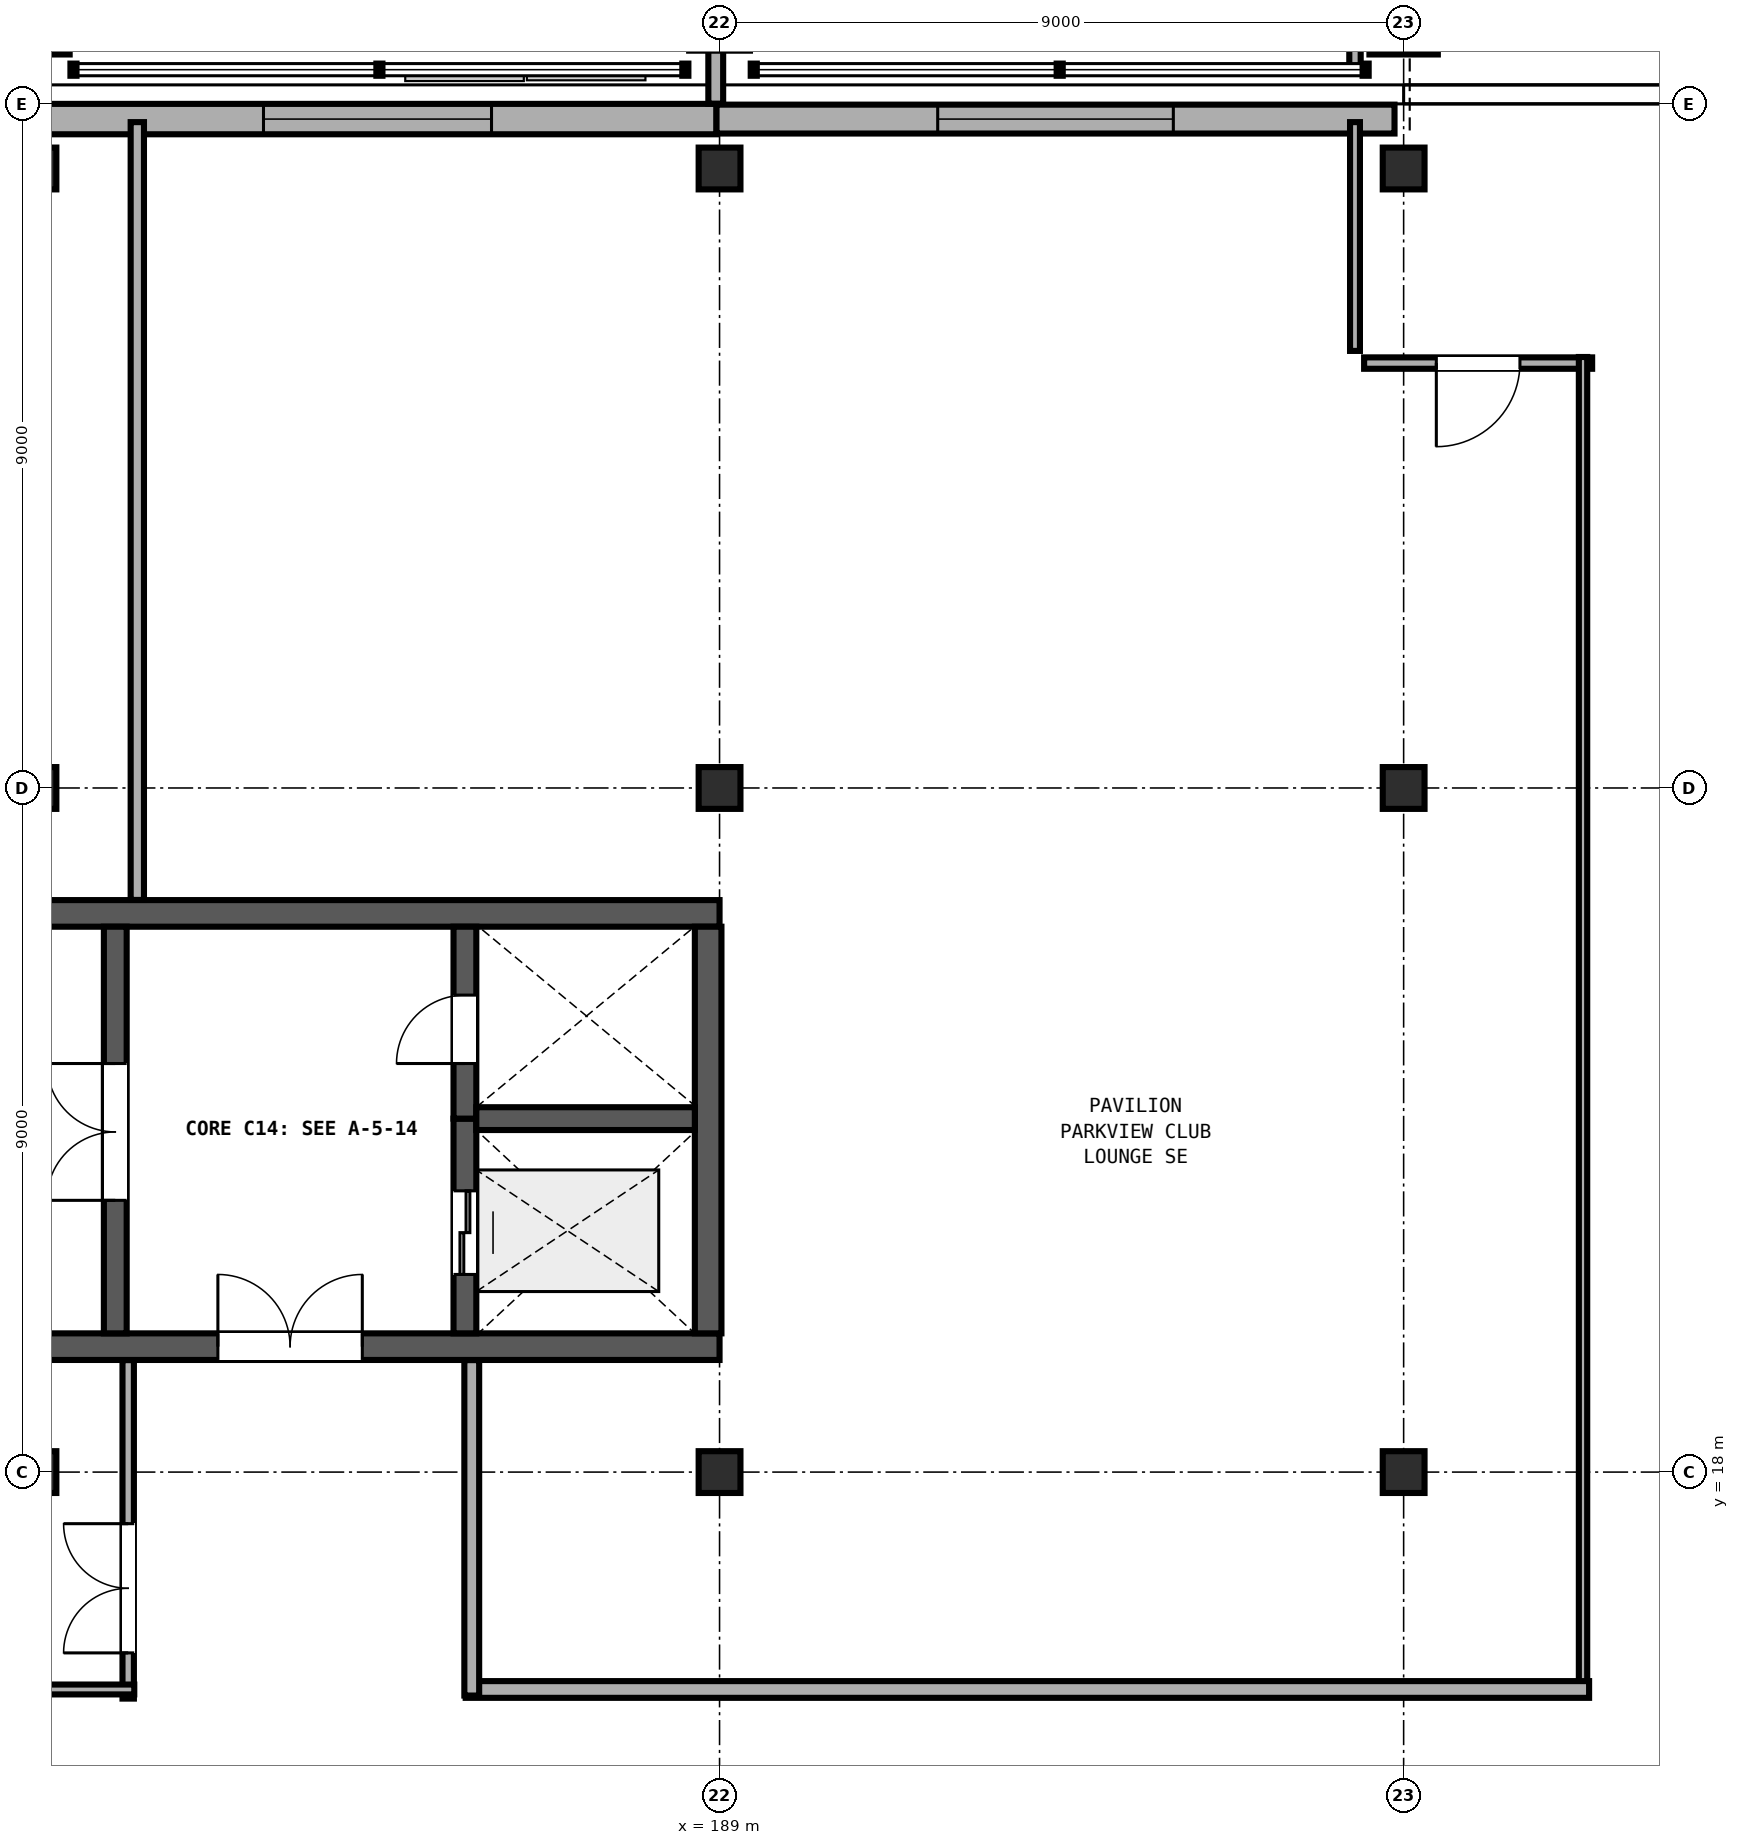
"""IFC4 building model, lengths in metres.
Left out: names, types, materials, properties, quantities, classifications, styles, units other than length and angle.
Written with IfcOpenShell. Run it as: python <this file> out.ifc"""

import sys

from ifc_helpers import new_model, si_unit, direction, frame, frame_2d, origin, origin_2d, place, context, subcontext, project, spatial, rectangle, extrude, element, fill, save


model = new_model("IFC4")
c1 = context("Model", 3, precision=1e-05, world=origin(), true_north=direction((0.0, 1.0)))
c2 = subcontext(c1, "Body", "Model", "MODEL_VIEW")
j1 = project(units=[si_unit("LENGTHUNIT", "METRE"), si_unit("PLANEANGLEUNIT", "RADIAN")], contexts=[c1])
p1 = place(None, origin())
s1 = spatial("IfcSite", under=j1, at=p1, CompositionType="ELEMENT")
p2 = place(p1, origin())
s2 = spatial("IfcBuilding", under=s1, at=p2, CompositionType="ELEMENT")
p3 = place(p2, frame((0.0, 0.0, 9.6)))
s3 = spatial("IfcBuildingStorey", under=s2, at=p3, CompositionType="ELEMENT", Elevation=9.6)
for number, where, z_axis, x_axis in (
    (1, (180.0, 37.1, 0.0), (0.0, 0.0, 1.0), (1.0, 0.0, 0.0)),
    (2, (198.0, 37.1, 0.0), (0.0, 0.0, 1.0), (1.0, 0.0, 0.0)),
):
    element("IfcColumn", number, at=place(p3, frame(where, z_axis=z_axis, x_axis=x_axis)), inside=s3, PredefinedType="COLUMN", context=c2, shape_type="SweptSolid", body=[
        extrude(rectangle(XDim=0.9, YDim=0.9, at=origin_2d()), origin(), (0.0, 0.0, 1.0), 4.8),
    ])
for number, where, z_axis, x_axis in (
    (3, (180.0, 18.0, 0.0), (0.0, 0.0, 1.0), (1.0, 0.0, 0.0)),
    (4, (180.0, 27.0, 0.0), (0.0, 0.0, 1.0), (1.0, 0.0, 0.0)),
    (5, (180.0, 35.15, 0.0), (0.0, 0.0, 1.0), (1.0, 0.0, 0.0)),
    (6, (189.0, 18.0, 0.0), (0.0, 0.0, 1.0), (1.0, 0.0, 0.0)),
    (7, (189.0, 27.0, 0.0), (0.0, 0.0, 1.0), (1.0, 0.0, 0.0)),
    (8, (189.0, 35.15, 0.0), (0.0, 0.0, 1.0), (1.0, 0.0, 0.0)),
    (9, (198.0, 18.0, 0.0), (0.0, 0.0, 1.0), (1.0, 0.0, 0.0)),
    (10, (198.0, 27.0, 0.0), (0.0, 0.0, 1.0), (1.0, 0.0, 0.0)),
    (11, (198.0, 35.15, 0.0), (0.0, 0.0, 1.0), (1.0, 0.0, 0.0)),
):
    element("IfcColumn", number, at=place(p3, frame(where, z_axis=z_axis, x_axis=x_axis)), inside=s3, PredefinedType="COLUMN", context=c2, shape_type="SweptSolid", body=[
        extrude(rectangle(XDim=0.55, YDim=0.55, at=origin_2d()), origin(), (0.0, 0.0, 1.0), 4.8),
    ])
p4 = place(p3, frame((171.0, 19.65, 0.0), z_axis=(0.0, 0.0, 1.0), x_axis=(1.0, 0.0, 0.0)))
e12 = element("IfcWall", 12, at=p4, inside=s3, PredefinedType="SHEAR", context=c2, shape_type="SweptSolid", body=[
    extrude(rectangle(XDim=18.0, YDim=0.35, at=frame_2d((9.0, 0.0))), origin(), (0.0, 0.0, 1.0), 4.555),
])
p5 = place(p4, frame((11.4, 0.0, 0.0)))
e13 = element("IfcOpeningElement", 13, at=p5, cuts=e12, PredefinedType="OPENING", context=c2, shape_type="SweptSolid", body=[
    extrude(rectangle(XDim=1.9, YDim=2.25, at=frame_2d((0.95, 1.125))), frame((0.0, 0.185, 0.0), z_axis=(0.0, -1.0, 0.0), x_axis=(1.0, 0.0, 0.0)), (0.0, 0.0, 1.0), 0.37),
])
p6 = place(p3, frame((189.0, 25.35, 0.0), z_axis=(0.0, 0.0, 1.0), x_axis=(-1.0, 0.0, 0.0)))
e14 = element("IfcWall", 14, at=p6, inside=s3, PredefinedType="SHEAR", context=c2, shape_type="SweptSolid", body=[
    extrude(rectangle(XDim=18.0, YDim=0.35, at=frame_2d((9.0, 0.0))), origin(), (0.0, 0.0, 1.0), 4.555),
])
p7 = place(p3, frame((188.85, 19.825, 0.0), z_axis=(0.0, 0.0, 1.0), x_axis=(0.0, 1.0, 0.0)))
e15 = element("IfcWall", 15, at=p7, inside=s3, PredefinedType="SHEAR", context=c2, shape_type="SweptSolid", body=[
    extrude(rectangle(XDim=5.35, YDim=0.35, at=frame_2d((2.675, 0.0))), origin(), (0.0, 0.0, 1.0), 4.555),
])
p8 = place(p3, frame((181.05, 19.825, 0.0), z_axis=(0.0, 0.0, 1.0), x_axis=(0.0, 1.0, 0.0)))
e16 = element("IfcWall", 16, at=p8, inside=s3, PredefinedType="SHEAR", context=c2, shape_type="SweptSolid", body=[
    extrude(rectangle(XDim=5.35, YDim=0.3, at=frame_2d((2.675, 0.0))), origin(), (0.0, 0.0, 1.0), 4.555),
])
p9 = place(p8, frame((1.75, 0.0, 0.0)))
e17 = element("IfcOpeningElement", 17, at=p9, cuts=e16, PredefinedType="OPENING", context=c2, shape_type="SweptSolid", body=[
    extrude(rectangle(XDim=1.8, YDim=2.25, at=frame_2d((0.9, 1.125))), frame((0.0, 0.16, 0.0), z_axis=(0.0, -1.0, 0.0), x_axis=(1.0, 0.0, 0.0)), (0.0, 0.0, 1.0), 0.32),
])
p10 = place(p3, frame((185.65, 19.825, 0.0), z_axis=(0.0, 0.0, 1.0), x_axis=(0.0, 1.0, 0.0)))
e18 = element("IfcWall", 18, at=p10, inside=s3, PredefinedType="SHEAR", context=c2, shape_type="SweptSolid", body=[
    extrude(rectangle(XDim=2.825, YDim=0.3, at=frame_2d((1.413, 0.0))), origin(), (0.0, 0.0, 1.0), 4.555),
])
p11 = place(p10, frame((0.775, 0.0, 0.0)))
e19 = element("IfcOpeningElement", 19, at=p11, cuts=e18, PredefinedType="OPENING", context=c2, shape_type="SweptSolid", body=[
    extrude(rectangle(XDim=1.1, YDim=2.1, at=frame_2d((0.55, 1.05))), frame((0.0, 0.16, 0.0), z_axis=(0.0, -1.0, 0.0), x_axis=(1.0, 0.0, 0.0)), (0.0, 0.0, 1.0), 0.32),
])
p12 = place(p3, frame((185.65, 22.65, 0.0), z_axis=(0.0, 0.0, 1.0), x_axis=(0.0, 1.0, 0.0)))
e20 = element("IfcWall", 20, at=p12, inside=s3, PredefinedType="SHEAR", context=c2, shape_type="SweptSolid", body=[
    extrude(rectangle(XDim=2.525, YDim=0.3, at=frame_2d((1.263, 0.0))), origin(), (0.0, 0.0, 1.0), 4.555),
])
p13 = place(p12, frame((0.725, 0.0, 0.0)))
e21 = element("IfcOpeningElement", 21, at=p13, cuts=e20, PredefinedType="OPENING", context=c2, shape_type="SweptSolid", body=[
    extrude(rectangle(XDim=0.9, YDim=2.1, at=frame_2d((0.45, 1.05))), frame((0.0, 0.16, 0.0), z_axis=(0.0, -1.0, 0.0), x_axis=(1.0, 0.0, 0.0)), (0.0, 0.0, 1.0), 0.32),
])
p14 = place(p3, frame((185.8, 22.65, 0.0), z_axis=(0.0, 0.0, 1.0), x_axis=(1.0, 0.0, 0.0)))
e22 = element("IfcWall", 22, at=p14, inside=s3, PredefinedType="SHEAR", context=c2, shape_type="SweptSolid", body=[
    extrude(rectangle(XDim=2.875, YDim=0.3, at=frame_2d((1.438, 0.0))), origin(), (0.0, 0.0, 1.0), 4.555),
])
p15 = place(p3, frame((180.04, 35.8, 0.0), z_axis=(0.0, 0.0, 1.0), x_axis=(1.0, 0.0, 0.0)))
e23 = element("IfcWall", 23, at=p15, inside=s3, PredefinedType="SOLIDWALL", context=c2, shape_type="SweptSolid", body=[
    extrude(rectangle(XDim=8.92, YDim=0.4, at=frame_2d((4.46, 0.0))), origin(), (0.0, 0.0, 1.0), 3.58),
])
p16 = place(p15, frame((2.96, 0.0, 0.9)))
e24 = element("IfcOpeningElement", 24, at=p16, cuts=e23, PredefinedType="OPENING", context=c2, shape_type="SweptSolid", body=[
    extrude(rectangle(XDim=3.0, YDim=2.2, at=frame_2d((1.5, 1.1))), frame((0.0, 0.21, 0.0), z_axis=(0.0, -1.0, 0.0), x_axis=(1.0, 0.0, 0.0)), (0.0, 0.0, 1.0), 0.42),
])
p17 = place(p3, frame((188.96, 35.8, 0.0), z_axis=(0.0, 0.0, 1.0), x_axis=(1.0, 0.0, 0.0)))
e25 = element("IfcWall", 25, at=p17, inside=s3, PredefinedType="SOLIDWALL", context=c2, shape_type="SweptSolid", body=[
    extrude(rectangle(XDim=8.92, YDim=0.38, at=frame_2d((4.46, 0.0))), origin(), (0.0, 0.0, 1.0), 3.58),
])
p18 = place(p17, frame((2.91, 0.0, 0.9)))
e26 = element("IfcOpeningElement", 26, at=p18, cuts=e25, PredefinedType="OPENING", context=c2, shape_type="SweptSolid", body=[
    extrude(rectangle(XDim=3.1, YDim=2.1, at=frame_2d((1.55, 1.05))), frame((0.0, 0.2, 0.0), z_axis=(0.0, -1.0, 0.0), x_axis=(1.0, 0.0, 0.0)), (0.0, 0.0, 1.0), 0.4),
])
p19 = place(p3, frame((188.95, 53.173, 0.0), z_axis=(0.0, 0.0, 1.0), x_axis=(0.0, -1.0, 0.0)))
e27 = element("IfcWall", 27, at=p19, inside=s3, PredefinedType="PARTITIONING", context=c2, shape_type="SweptSolid", body=[
    extrude(rectangle(XDim=17.17, YDim=0.195, at=frame_2d((8.585, 0.0))), origin(), (0.0, 0.0, 1.0), 3.56),
])
p20 = place(p3, frame((197.36, 39.5, 0.0), z_axis=(0.0, 0.0, 1.0), x_axis=(0.0, -1.0, 0.0)))
e28 = element("IfcWall", 28, at=p20, inside=s3, PredefinedType="PARTITIONING", context=c2, shape_type="SweptSolid", body=[
    extrude(rectangle(XDim=3.017, YDim=0.15, at=frame_2d((1.509, 0.0))), origin(), (0.0, 0.0, 1.0), 3.56),
])
p21 = place(p3, frame((200.48, 32.59, 0.0), z_axis=(0.0, 0.0, 1.0), x_axis=(-1.0, 0.0, 0.0)))
e29 = element("IfcWall", 29, at=p21, inside=s3, PredefinedType="PARTITIONING", context=c2, shape_type="SweptSolid", body=[
    extrude(rectangle(XDim=3.0, YDim=0.15, at=frame_2d((1.5, 0.0))), origin(), (0.0, 0.0, 1.0), 3.56),
])
p22 = place(p21, frame((0.95, 0.0, 0.0)))
e30 = element("IfcOpeningElement", 30, at=p22, cuts=e29, PredefinedType="OPENING", context=c2, shape_type="SweptSolid", body=[
    extrude(rectangle(XDim=1.1, YDim=2.1, at=frame_2d((0.55, 1.05))), frame((0.0, 0.085, 0.0), z_axis=(0.0, -1.0, 0.0), x_axis=(1.0, 0.0, 0.0)), (0.0, 0.0, 1.0), 0.17),
])
p23 = place(p3, frame((197.36, 35.76, 0.0), z_axis=(0.0, 0.0, 1.0), x_axis=(0.0, -1.0, 0.0)))
e31 = element("IfcWall", 31, at=p23, inside=s3, PredefinedType="PARTITIONING", context=c2, shape_type="SweptSolid", body=[
    extrude(rectangle(XDim=3.01, YDim=0.13, at=frame_2d((1.505, 0.0))), origin(), (0.0, 0.0, 1.0), 3.56),
])
p24 = place(p3, frame((200.36, 32.67, 0.0), z_axis=(0.0, 0.0, 1.0), x_axis=(0.0, -1.0, 0.0)))
e32 = element("IfcWall", 32, at=p24, inside=s3, PredefinedType="PARTITIONING", context=c2, shape_type="SweptSolid", body=[
    extrude(rectangle(XDim=17.61, YDim=0.11, at=frame_2d((8.805, 0.0))), origin(), (0.0, 0.0, 1.0), 3.56),
])
p25 = place(p3, frame((200.44, 15.14, 0.0), z_axis=(0.0, 0.0, 1.0), x_axis=(-1.0, 0.0, 0.0)))
e33 = element("IfcWall", 33, at=p25, inside=s3, PredefinedType="PARTITIONING", context=c2, shape_type="SweptSolid", body=[
    extrude(rectangle(XDim=14.78, YDim=0.22, at=frame_2d((7.39, 0.0))), origin(), (0.0, 0.0, 1.0), 3.56),
])
p26 = place(p3, frame((185.74, 15.06, 0.0), z_axis=(0.0, 0.0, 1.0), x_axis=(0.0, 1.0, 0.0)))
e34 = element("IfcWall", 34, at=p26, inside=s3, PredefinedType="PARTITIONING", context=c2, shape_type="SweptSolid", body=[
    extrude(rectangle(XDim=4.413, YDim=0.195, at=frame_2d((2.207, 0.0))), origin(), (0.0, 0.0, 1.0), 3.56),
])
p27 = place(p3, frame((181.34, 25.527, 0.0), z_axis=(0.0, 0.0, 1.0), x_axis=(0.0, 1.0, 0.0)))
e35 = element("IfcWall", 35, at=p27, inside=s3, PredefinedType="PARTITIONING", context=c2, shape_type="SweptSolid", body=[
    extrude(rectangle(XDim=10.233, YDim=0.175, at=frame_2d((5.116, 0.0))), origin(), (0.0, 0.0, 1.0), 3.56),
])
p28 = place(p3, frame((181.22, 15.02, 0.0), z_axis=(0.0, 0.0, 1.0), x_axis=(0.0, 1.0, 0.0)))
e36 = element("IfcWall", 36, at=p28, inside=s3, PredefinedType="PARTITIONING", context=c2, shape_type="SweptSolid", body=[
    extrude(rectangle(XDim=4.453, YDim=0.15, at=frame_2d((2.227, 0.0))), origin(), (0.0, 0.0, 1.0), 3.56),
])
p29 = place(p28, frame((0.601, 0.0, 0.0)))
e37 = element("IfcOpeningElement", 37, at=p29, cuts=e36, PredefinedType="OPENING", context=c2, shape_type="SweptSolid", body=[
    extrude(rectangle(XDim=1.7, YDim=2.2, at=frame_2d((0.85, 1.1))), frame((0.0, 0.085, 0.0), z_axis=(0.0, -1.0, 0.0), x_axis=(1.0, 0.0, 0.0)), (0.0, 0.0, 1.0), 0.17),
])
p30 = place(p3, frame((181.3, 15.14, 0.0), z_axis=(0.0, 0.0, 1.0), x_axis=(-1.0, 0.0, 0.0)))
e38 = element("IfcWall", 38, at=p30, inside=s3, PredefinedType="PARTITIONING", context=c2, shape_type="SweptSolid", body=[
    extrude(rectangle(XDim=15.97, YDim=0.13, at=frame_2d((7.985, 0.0))), origin(), (0.0, 0.0, 1.0), 3.56),
])
p31 = place(p16, origin())
e39 = element("IfcWindow", 39, at=p31, inside=s3, PartitioningType="DOUBLE_PANEL_VERTICAL", PredefinedType="WINDOW", context=c2, shape_type="SweptSolid", body=[
    extrude(rectangle(XDim=3.0, YDim=2.2, at=frame_2d((1.5, 1.1))), frame((0.0, 0.03, 0.0), z_axis=(0.0, -1.0, 0.0), x_axis=(1.0, 0.0, 0.0)), (0.0, 0.0, 1.0), 0.06),
])
fill(e24, e39)
p32 = place(p18, origin())
e40 = element("IfcWindow", 40, at=p32, inside=s3, PartitioningType="DOUBLE_PANEL_VERTICAL", PredefinedType="WINDOW", context=c2, shape_type="SweptSolid", body=[
    extrude(rectangle(XDim=3.1, YDim=2.1, at=frame_2d((1.55, 1.05))), frame((0.0, 0.03, 0.0), z_axis=(0.0, -1.0, 0.0), x_axis=(1.0, 0.0, 0.0)), (0.0, 0.0, 1.0), 0.06),
])
fill(e26, e40)
p33 = place(p9, origin())
e41 = element("IfcDoor", 41, at=p33, inside=s3, OperationType="DOUBLE_DOOR_SINGLE_SWING", PredefinedType="DOOR", context=c2, shape_type="SweptSolid", body=[
    extrude(rectangle(XDim=1.8, YDim=2.25, at=frame_2d((0.9, 1.125))), frame((0.0, 0.025, 0.0), z_axis=(0.0, -1.0, 0.0), x_axis=(1.0, 0.0, 0.0)), (0.0, 0.0, 1.0), 0.05),
])
fill(e17, e41)
p34 = place(p13, origin())
e42 = element("IfcDoor", 42, at=p34, inside=s3, OperationType="SINGLE_SWING_LEFT", PredefinedType="DOOR", context=c2, shape_type="SweptSolid", body=[
    extrude(rectangle(XDim=0.9, YDim=2.1, at=frame_2d((0.45, 1.05))), frame((0.0, 0.025, 0.0), z_axis=(0.0, -1.0, 0.0), x_axis=(1.0, 0.0, 0.0)), (0.0, 0.0, 1.0), 0.05),
])
fill(e21, e42)
p35 = place(p11, origin())
e43 = element("IfcDoor", 43, at=p35, inside=s3, OperationType="DOUBLE_DOOR_SLIDING", PredefinedType="DOOR", context=c2, shape_type="SweptSolid", body=[
    extrude(rectangle(XDim=1.1, YDim=2.1, at=frame_2d((0.55, 1.05))), frame((0.0, 0.025, 0.0), z_axis=(0.0, -1.0, 0.0), x_axis=(1.0, 0.0, 0.0)), (0.0, 0.0, 1.0), 0.05),
])
fill(e19, e43)
p36 = place(p5, origin())
e44 = element("IfcDoor", 44, at=p36, inside=s3, OperationType="DOUBLE_DOOR_SINGLE_SWING", PredefinedType="DOOR", context=c2, shape_type="SweptSolid", body=[
    extrude(rectangle(XDim=1.9, YDim=2.25, at=frame_2d((0.95, 1.125))), frame((0.0, 0.025, 0.0), z_axis=(0.0, -1.0, 0.0), x_axis=(1.0, 0.0, 0.0)), (0.0, 0.0, 1.0), 0.05),
])
fill(e13, e44)
p37 = place(p22, origin())
e45 = element("IfcDoor", 45, at=p37, inside=s3, OperationType="SINGLE_SWING_RIGHT", PredefinedType="DOOR", context=c2, shape_type="SweptSolid", body=[
    extrude(rectangle(XDim=1.1, YDim=2.1, at=frame_2d((0.55, 1.05))), frame((0.0, 0.025, 0.0), z_axis=(0.0, -1.0, 0.0), x_axis=(1.0, 0.0, 0.0)), (0.0, 0.0, 1.0), 0.05),
])
fill(e30, e45)
p38 = place(p29, origin())
e46 = element("IfcDoor", 46, at=p38, inside=s3, OperationType="DOUBLE_DOOR_SINGLE_SWING", PredefinedType="DOOR", context=c2, shape_type="SweptSolid", body=[
    extrude(rectangle(XDim=1.7, YDim=2.2, at=frame_2d((0.85, 1.1))), frame((0.0, 0.025, 0.0), z_axis=(0.0, -1.0, 0.0), x_axis=(1.0, 0.0, 0.0)), (0.0, 0.0, 1.0), 0.05),
])
fill(e37, e46)
save(model, sys.argv[1])
